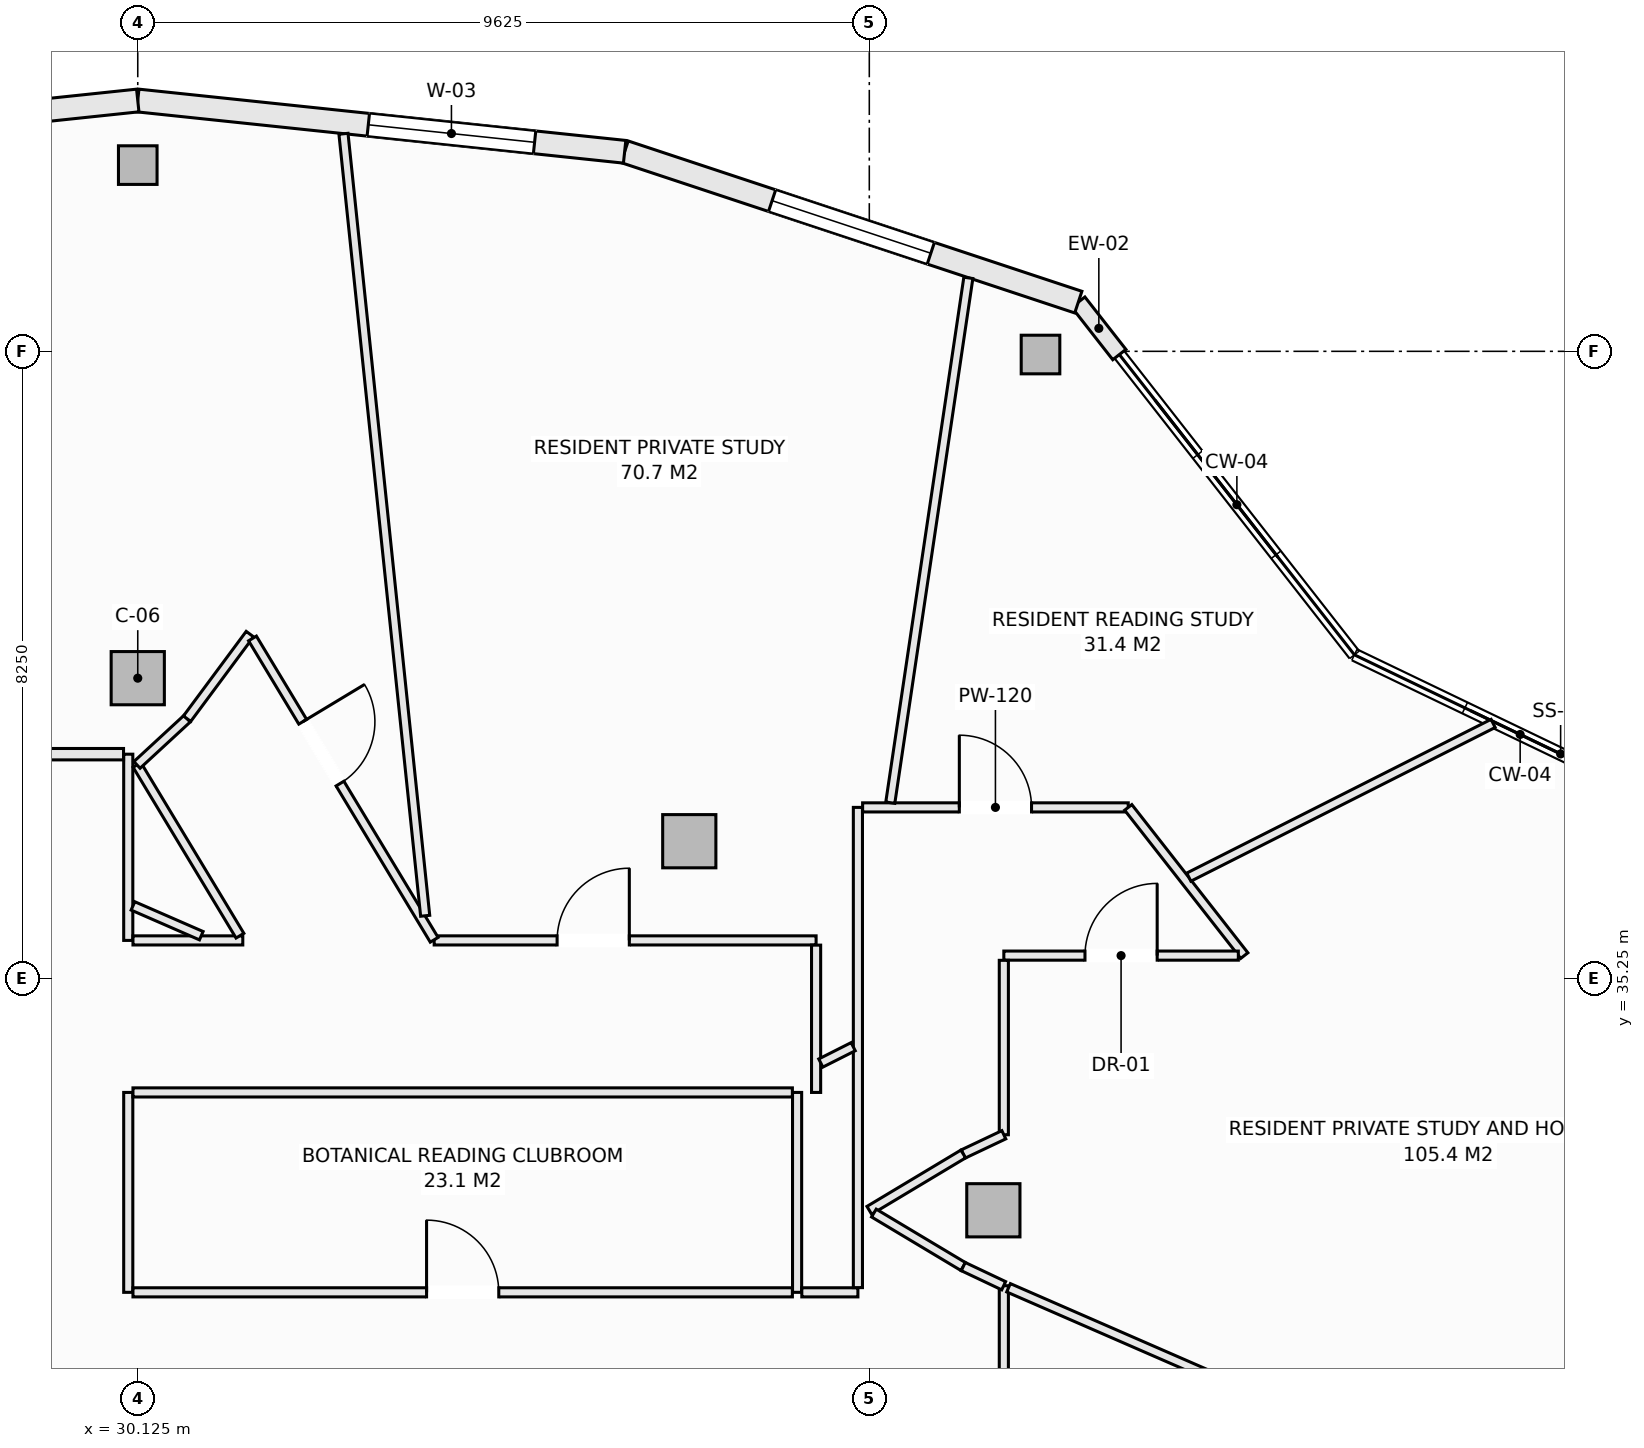
"""IFC4 building model, lengths in metres.
Left out: names, types, materials, properties, quantities, classifications, styles, units other than length and angle.
Written with IfcOpenShell. Run it as: python <this file> out.ifc"""

import sys

from ifc_helpers import new_model, si_unit, direction, frame, frame_2d, origin, origin_2d, place, context, subcontext, project, spatial, rectangle, hollow_rectangle, extrude, element, fill, save


model = new_model("IFC4")
c1 = context("Model", 3, precision=1e-05, world=origin(), true_north=direction((0.0, 1.0)))
c2 = subcontext(c1, "Body", "Model", "MODEL_VIEW")
j1 = project(units=[si_unit("LENGTHUNIT", "METRE"), si_unit("PLANEANGLEUNIT", "RADIAN")], contexts=[c1])
p1 = place(None, origin())
s1 = spatial("IfcSite", under=j1, at=p1, CompositionType="ELEMENT")
p2 = place(p1, origin())
s2 = spatial("IfcBuilding", under=s1, at=p2, CompositionType="ELEMENT")
p3 = place(p2, frame((0.0, 0.0, 226.1)))
s3 = spatial("IfcBuildingStorey", under=s2, at=p3, CompositionType="ELEMENT", Elevation=226.1)
for number, where, z_axis, x_axis in (
    (1, (42.003, 43.458, -0.27), (0.0, 0.0, 1.0), (1.0, 0.0, 0.0)),
    (2, (30.125, 45.95, -0.27), (0.0, 0.0, 1.0), (1.0, 0.0, 0.0)),
):
    element("IfcColumn", number, at=place(p3, frame(where, z_axis=z_axis, x_axis=x_axis)), inside=s3, PredefinedType="COLUMN", context=c2, shape_type="SweptSolid", body=[
        extrude(hollow_rectangle(XDim=0.508, YDim=0.508, WallThickness=0.019, at=origin_2d()), origin(), (0.0, 0.0, 1.0), 3.3),
    ])
for number, where, z_axis, x_axis in (
    (3, (41.382, 32.199, -0.27), (0.0, 0.0, 1.0), (1.0, 0.0, 0.0)),
    (4, (37.382, 37.055, -0.27), (0.0, 0.0, 1.0), (1.0, 0.0, 0.0)),
    (5, (30.125, 39.2, -0.27), (0.0, 0.0, 1.0), (1.0, 0.0, 0.0)),
):
    element("IfcColumn", number, at=place(p3, frame(where, z_axis=z_axis, x_axis=x_axis)), inside=s3, PredefinedType="COLUMN", context=c2, shape_type="SweptSolid", body=[
        extrude(rectangle(XDim=0.7, YDim=0.7, at=origin_2d()), origin(), (0.0, 0.0, 1.0), 3.3),
    ])
p4 = place(p3, frame((42.5, 44.147, 0.0), z_axis=(0.0, 0.0, 1.0), x_axis=(0.61650363284, -0.787352062736, 0.0)))
e6 = element("IfcWall", 6, at=p4, inside=s3, PredefinedType="SOLIDWALL", context=c2, shape_type="SweptSolid", body=[
    extrude(rectangle(XDim=0.876, YDim=0.22, at=frame_2d((0.438, 0.0))), origin(), (0.0, 0.0, 1.0), 2.605),
])
p5 = place(p3, frame((36.531, 46.125, 0.0), z_axis=(0.0, 0.0, 1.0), x_axis=(0.949240877604, -0.314550085495, 0.0)))
e7 = element("IfcWall", 7, at=p5, inside=s3, PredefinedType="SOLIDWALL", context=c2, shape_type="SweptSolid", body=[
    extrude(rectangle(XDim=6.288, YDim=0.3, at=frame_2d((3.144, 0.0))), origin(), (0.0, 0.0, 1.0), 2.605),
])
p6 = place(p5, frame((2.044, 0.0, 0.72)))
e8 = element("IfcOpeningElement", 8, at=p6, cuts=e7, PredefinedType="OPENING", context=c2, shape_type="SweptSolid", body=[
    extrude(rectangle(XDim=2.2, YDim=1.65, at=frame_2d((1.1, 0.825))), frame((0.0, 0.16, 0.0), z_axis=(0.0, -1.0, 0.0), x_axis=(1.0, 0.0, 0.0)), (0.0, 0.0, 1.0), 0.32),
])
p7 = place(p3, frame((30.125, 46.8, 0.0), z_axis=(0.0, 0.0, 1.0), x_axis=(0.994497142298, -0.104763705363, 0.0)))
e9 = element("IfcWall", 9, at=p7, inside=s3, PredefinedType="SOLIDWALL", context=c2, shape_type="SweptSolid", body=[
    extrude(rectangle(XDim=6.441, YDim=0.3, at=frame_2d((3.221, 0.0))), origin(), (0.0, 0.0, 1.0), 2.605),
])
p8 = place(p7, frame((3.05, 0.0, 0.72)))
e10 = element("IfcOpeningElement", 10, at=p8, cuts=e9, PredefinedType="OPENING", context=c2, shape_type="SweptSolid", body=[
    extrude(rectangle(XDim=2.2, YDim=1.65, at=frame_2d((1.1, 0.825))), frame((0.0, 0.16, 0.0), z_axis=(0.0, -1.0, 0.0), x_axis=(1.0, 0.0, 0.0)), (0.0, 0.0, 1.0), 0.32),
])
p9 = place(p3, frame((23.719, 46.125, 0.0), z_axis=(0.0, 0.0, 1.0), x_axis=(0.994497142298, 0.104763705363, 0.0)))
e11 = element("IfcWall", 11, at=p9, inside=s3, PredefinedType="SOLIDWALL", context=c2, shape_type="SweptSolid", body=[
    extrude(rectangle(XDim=6.441, YDim=0.3, at=frame_2d((3.221, 0.0))), origin(), (0.0, 0.0, 1.0), 2.605),
])
p10 = place(p9, frame((2.121, 0.0, 0.72)))
e12 = element("IfcOpeningElement", 12, at=p10, cuts=e11, PredefinedType="OPENING", context=c2, shape_type="SweptSolid", body=[
    extrude(rectangle(XDim=2.2, YDim=1.65, at=frame_2d((1.1, 0.825))), frame((0.0, 0.16, 0.0), z_axis=(0.0, -1.0, 0.0), x_axis=(1.0, 0.0, 0.0)), (0.0, 0.0, 1.0), 0.32),
])
p11 = place(p3, frame((30.0, 31.12, 0.0), z_axis=(0.0, 0.0, 1.0), x_axis=(0.0, 1.0, 0.0)))
e13 = element("IfcWall", 13, at=p11, inside=s3, PredefinedType="PARTITIONING", context=c2, shape_type="SweptSolid", body=[
    extrude(rectangle(XDim=2.63, YDim=0.12, at=frame_2d((1.315, 0.0))), origin(), (0.0, 0.0, 1.0), 3.03),
])
p12 = place(p3, frame((30.0, 35.75, 0.0), z_axis=(0.0, 0.0, 1.0), x_axis=(0.0, 1.0, 0.0)))
e14 = element("IfcWall", 14, at=p12, inside=s3, PredefinedType="PARTITIONING", context=c2, shape_type="SweptSolid", body=[
    extrude(rectangle(XDim=2.45, YDim=0.12, at=frame_2d((1.225, 0.0))), origin(), (0.0, 0.0, 1.0), 3.03),
])
p13 = place(p3, frame((38.8, 31.12, 0.0), z_axis=(0.0, 0.0, 1.0), x_axis=(0.0, 1.0, 0.0)))
e15 = element("IfcWall", 15, at=p13, inside=s3, PredefinedType="PARTITIONING", context=c2, shape_type="SweptSolid", body=[
    extrude(rectangle(XDim=2.63, YDim=0.12, at=frame_2d((1.315, 0.0))), origin(), (0.0, 0.0, 1.0), 3.03),
])
p14 = place(p3, frame((30.062, 31.12, 0.0), z_axis=(0.0, 0.0, 1.0), x_axis=(1.0, 0.0, 0.0)))
e16 = element("IfcWall", 16, at=p14, inside=s3, PredefinedType="PARTITIONING", context=c2, shape_type="SweptSolid", body=[
    extrude(rectangle(XDim=8.676, YDim=0.12, at=frame_2d((4.338, 0.0))), origin(), (0.0, 0.0, 1.0), 3.03),
])
p15 = place(p14, frame((3.863, 0.0, 0.0)))
e17 = element("IfcOpeningElement", 17, at=p15, cuts=e16, PredefinedType="OPENING", context=c2, shape_type="SweptSolid", body=[
    extrude(rectangle(XDim=0.95, YDim=2.1, at=frame_2d((0.475, 1.05))), frame((0.0, 0.07, 0.0), z_axis=(0.0, -1.0, 0.0), x_axis=(1.0, 0.0, 0.0)), (0.0, 0.0, 1.0), 0.14),
])
p16 = place(p3, frame((38.862, 31.12, 0.0), z_axis=(0.0, 0.0, 1.0), x_axis=(1.0, 0.0, 0.0)))
e18 = element("IfcWall", 18, at=p16, inside=s3, PredefinedType="PARTITIONING", context=c2, shape_type="SweptSolid", body=[
    extrude(rectangle(XDim=0.738, YDim=0.12, at=frame_2d((0.369, 0.0))), origin(), (0.0, 0.0, 1.0), 3.03),
])
p17 = place(p3, frame((30.062, 33.75, 0.0), z_axis=(0.0, 0.0, 1.0), x_axis=(1.0, 0.0, 0.0)))
e19 = element("IfcWall", 19, at=p17, inside=s3, PredefinedType="PARTITIONING", context=c2, shape_type="SweptSolid", body=[
    extrude(rectangle(XDim=8.676, YDim=0.12, at=frame_2d((4.338, 0.0))), origin(), (0.0, 0.0, 1.0), 3.03),
])
p18 = place(p3, frame((27.227, 38.2, 0.0), z_axis=(0.0, 0.0, 1.0), x_axis=(1.0, 0.0, 0.0)))
e20 = element("IfcWall", 20, at=p18, inside=s3, PredefinedType="PARTITIONING", context=c2, shape_type="SweptSolid", body=[
    extrude(rectangle(XDim=2.711, YDim=0.15, at=frame_2d((1.355, 0.0))), origin(), (0.0, 0.0, 1.0), 3.03),
])
p19 = place(p3, frame((30.062, 35.75, 0.0), z_axis=(0.0, 0.0, 1.0), x_axis=(1.0, 0.0, 0.0)))
e21 = element("IfcWall", 21, at=p19, inside=s3, PredefinedType="PARTITIONING", context=c2, shape_type="SweptSolid", body=[
    extrude(rectangle(XDim=1.445, YDim=0.12, at=frame_2d((0.723, 0.0))), origin(), (0.0, 0.0, 1.0), 3.03),
])
p20 = place(p3, frame((34.025, 35.75, 0.0), z_axis=(0.0, 0.0, 1.0), x_axis=(1.0, 0.0, 0.0)))
e22 = element("IfcWall", 22, at=p20, inside=s3, PredefinedType="PARTITIONING", context=c2, shape_type="SweptSolid", body=[
    extrude(rectangle(XDim=5.025, YDim=0.12, at=frame_2d((2.513, 0.0))), origin(), (0.0, 0.0, 1.0), 2.478),
])
p21 = place(p20, frame((1.617, 0.0, 0.0)))
e23 = element("IfcOpeningElement", 23, at=p21, cuts=e22, PredefinedType="OPENING", context=c2, shape_type="SweptSolid", body=[
    extrude(rectangle(XDim=0.95, YDim=2.1, at=frame_2d((0.475, 1.05))), frame((0.0, 0.07, 0.0), z_axis=(0.0, -1.0, 0.0), x_axis=(1.0, 0.0, 0.0)), (0.0, 0.0, 1.0), 0.14),
])
p22 = place(p3, frame((30.115, 38.059, 0.0), z_axis=(0.0, 0.0, 1.0), x_axis=(0.516246227887, -0.85644020935, 0.0)))
e24 = element("IfcWall", 24, at=p22, inside=s3, PredefinedType="PARTITIONING", context=c2, shape_type="SweptSolid", body=[
    extrude(rectangle(XDim=2.624, YDim=0.12, at=frame_2d((1.312, 0.0))), origin(), (0.0, 0.0, 1.0), 3.03),
])
p23 = place(p3, frame((30.115, 38.059, 0.0), z_axis=(0.0, 0.0, 1.0), x_axis=(0.734991343239, 0.678076489316, 0.0)))
e25 = element("IfcWall", 25, at=p23, inside=s3, PredefinedType="PARTITIONING", context=c2, shape_type="SweptSolid", body=[
    extrude(rectangle(XDim=0.896, YDim=0.12, at=frame_2d((0.448, 0.0))), origin(), (0.0, 0.0, 1.0), 3.03),
])
p24 = place(p3, frame((30.774, 38.667, 0.0), z_axis=(0.0, 0.0, 1.0), x_axis=(0.596019138224, 0.802970227885, 0.0)))
e26 = element("IfcWall", 26, at=p24, inside=s3, PredefinedType="PARTITIONING", context=c2, shape_type="SweptSolid", body=[
    extrude(rectangle(XDim=1.386, YDim=0.12, at=frame_2d((0.693, 0.0))), origin(), (0.0, 0.0, 1.0), 3.03),
])
p25 = place(p3, frame((31.635, 39.723, 0.0), z_axis=(0.0, 0.0, 1.0), x_axis=(0.516340331217, -0.856383478565, 0.0)))
e27 = element("IfcWall", 27, at=p25, inside=s3, PredefinedType="PARTITIONING", context=c2, shape_type="SweptSolid", body=[
    extrude(rectangle(XDim=4.629, YDim=0.12, at=frame_2d((2.315, 0.0))), origin(), (0.0, 0.0, 1.0), 3.03),
])
p26 = place(p25, frame((1.28, 0.0, 0.0)))
e28 = element("IfcOpeningElement", 28, at=p26, cuts=e27, PredefinedType="OPENING", context=c2, shape_type="SweptSolid", body=[
    extrude(rectangle(XDim=0.95, YDim=2.1, at=frame_2d((0.475, 1.05))), frame((0.0, 0.07, 0.0), z_axis=(0.0, -1.0, 0.0), x_axis=(1.0, 0.0, 0.0)), (0.0, 0.0, 1.0), 0.14),
])
p27 = place(p3, frame((39.05, 33.75, 0.0), z_axis=(0.0, 0.0, 1.0), x_axis=(0.0, 1.0, 0.0)))
e29 = element("IfcWall", 29, at=p27, inside=s3, PredefinedType="PARTITIONING", context=c2, shape_type="SweptSolid", body=[
    extrude(rectangle(XDim=1.938, YDim=0.12, at=frame_2d((0.969, 0.0))), origin(), (0.0, 0.0, 1.0), 3.03),
])
p28 = place(p3, frame((39.6, 31.182, 0.0), z_axis=(0.0, 0.0, 1.0), x_axis=(0.0, 1.0, 0.0)))
e30 = element("IfcWall", 30, at=p28, inside=s3, PredefinedType="PARTITIONING", context=c2, shape_type="SweptSolid", body=[
    extrude(rectangle(XDim=6.318, YDim=0.12, at=frame_2d((3.159, 0.0))), origin(), (0.0, 0.0, 1.0), 3.03),
])
p29 = place(p3, frame((39.662, 37.5, 0.0), z_axis=(0.0, 0.0, 1.0), x_axis=(1.0, 0.0, 0.0)))
e31 = element("IfcWall", 31, at=p29, inside=s3, PredefinedType="PARTITIONING", context=c2, shape_type="SweptSolid", body=[
    extrude(rectangle(XDim=3.495, YDim=0.12, at=frame_2d((1.748, 0.0))), origin(), (0.0, 0.0, 1.0), 2.77),
])
p30 = place(p29, frame((1.272, 0.0, 0.0)))
e32 = element("IfcOpeningElement", 32, at=p30, cuts=e31, PredefinedType="OPENING", context=c2, shape_type="SweptSolid", body=[
    extrude(rectangle(XDim=0.95, YDim=2.1, at=frame_2d((0.475, 1.05))), frame((0.0, 0.07, 0.0), z_axis=(0.0, -1.0, 0.0), x_axis=(1.0, 0.0, 0.0)), (0.0, 0.0, 1.0), 0.14),
])
p31 = place(p3, frame((43.157, 37.5, 0.0), z_axis=(0.0, 0.0, 1.0), x_axis=(0.616571357052, -0.78729902938, 0.0)))
e33 = element("IfcWall", 33, at=p31, inside=s3, PredefinedType="PARTITIONING", context=c2, shape_type="SweptSolid", body=[
    extrude(rectangle(XDim=2.477, YDim=0.12, at=frame_2d((1.238, 0.0))), origin(), (0.0, 0.0, 1.0), 3.03),
])
p32 = place(p3, frame((41.52, 35.55, 0.0), z_axis=(0.0, 0.0, 1.0), x_axis=(1.0, 0.0, 0.0)))
e34 = element("IfcWall", 34, at=p32, inside=s3, PredefinedType="PARTITIONING", context=c2, shape_type="SweptSolid", body=[
    extrude(rectangle(XDim=3.085, YDim=0.12, at=frame_2d((1.542, 0.0))), origin(), (0.0, 0.0, 1.0), 3.03),
])
p33 = place(p32, frame((1.068, 0.0, 0.0)))
e35 = element("IfcOpeningElement", 35, at=p33, cuts=e34, PredefinedType="OPENING", context=c2, shape_type="SweptSolid", body=[
    extrude(rectangle(XDim=0.95, YDim=2.1, at=frame_2d((0.475, 1.05))), frame((0.0, 0.07, 0.0), z_axis=(0.0, -1.0, 0.0), x_axis=(1.0, 0.0, 0.0)), (0.0, 0.0, 1.0), 0.14),
])
p34 = place(p3, frame((41.52, 22.794, 0.0), z_axis=(0.0, 0.0, 1.0), x_axis=(0.0, 1.0, 0.0)))
e36 = element("IfcWall", 36, at=p34, inside=s3, PredefinedType="PARTITIONING", context=c2, shape_type="SweptSolid", body=[
    extrude(rectangle(XDim=8.413, YDim=0.12, at=frame_2d((4.207, 0.0))), origin(), (0.0, 0.0, 1.0), 2.478),
])
p35 = place(p34, frame((2.471, 0.0, 0.0)))
e37 = element("IfcOpeningElement", 37, at=p35, cuts=e36, PredefinedType="OPENING", context=c2, shape_type="SweptSolid", body=[
    extrude(rectangle(XDim=0.95, YDim=2.1, at=frame_2d((0.475, 1.05))), frame((0.0, 0.07, 0.0), z_axis=(0.0, -1.0, 0.0), x_axis=(1.0, 0.0, 0.0)), (0.0, 0.0, 1.0), 0.14),
])
p36 = place(p3, frame((41.52, 33.193, 0.0), z_axis=(0.0, 0.0, 1.0), x_axis=(0.0, 1.0, 0.0)))
e38 = element("IfcWall", 38, at=p36, inside=s3, PredefinedType="PARTITIONING", context=c2, shape_type="SweptSolid", body=[
    extrude(rectangle(XDim=2.295, YDim=0.12, at=frame_2d((1.147, 0.0))), origin(), (0.0, 0.0, 1.0), 3.03),
])
p37 = place(p3, frame((40.986, 32.94, 0.0), z_axis=(0.0, 0.0, 1.0), x_axis=(0.90356951601, 0.428441512621, 0.0)))
e39 = element("IfcWall", 39, at=p37, inside=s3, PredefinedType="PARTITIONING", context=c2, shape_type="SweptSolid", body=[
    extrude(rectangle(XDim=0.591, YDim=0.12, at=frame_2d((0.295, 0.0))), origin(), (0.0, 0.0, 1.0), 3.03),
])
p38 = place(p3, frame((39.75, 32.199, 0.0), z_axis=(0.0, 0.0, 1.0), x_axis=(0.857702120906, 0.514146935996, 0.0)))
e40 = element("IfcWall", 40, at=p38, inside=s3, PredefinedType="PARTITIONING", context=c2, shape_type="SweptSolid", body=[
    extrude(rectangle(XDim=1.441, YDim=0.12, at=frame_2d((0.721, 0.0))), origin(), (0.0, 0.0, 1.0), 3.03),
])
p39 = place(p3, frame((39.81, 32.163, 0.0), z_axis=(0.0, 0.0, 1.0), x_axis=(0.858011245414, -0.513630901273, 0.0)))
e41 = element("IfcWall", 41, at=p39, inside=s3, PredefinedType="PARTITIONING", context=c2, shape_type="SweptSolid", body=[
    extrude(rectangle(XDim=1.37, YDim=0.12, at=frame_2d((0.685, 0.0))), origin(), (0.0, 0.0, 1.0), 3.03),
])
p40 = place(p3, frame((40.986, 31.459, 0.0), z_axis=(0.0, 0.0, 1.0), x_axis=(0.903687141457, -0.428193356283, 0.0)))
e42 = element("IfcWall", 42, at=p40, inside=s3, PredefinedType="PARTITIONING", context=c2, shape_type="SweptSolid", body=[
    extrude(rectangle(XDim=0.588, YDim=0.12, at=frame_2d((0.294, 0.0))), origin(), (0.0, 0.0, 1.0), 3.03),
])
p41 = place(p3, frame((30.062, 36.204, 0.0), z_axis=(0.0, 0.0, 1.0), x_axis=(0.916602414635, -0.39979996684, 0.0)))
e43 = element("IfcWall", 43, at=p41, inside=s3, PredefinedType="PARTITIONING", context=c2, shape_type="SweptSolid", body=[
    extrude(rectangle(XDim=0.981, YDim=0.12, at=frame_2d((0.49, 0.0))), origin(), (0.0, 0.0, 1.0), 3.03),
])
p42 = place(p3, frame((41.582, 31.18, 0.0), z_axis=(0.0, 0.0, 1.0), x_axis=(0.916624100851, -0.399750244202, 0.0)))
e44 = element("IfcWall", 44, at=p42, inside=s3, PredefinedType="PARTITIONING", context=c2, shape_type="SweptSolid", body=[
    extrude(rectangle(XDim=14.074, YDim=0.12, at=frame_2d((7.037, 0.0))), origin(), (0.0, 0.0, 1.0), 2.478),
])
p43 = place(p3, frame((39.112, 34.137, 0.0), z_axis=(0.0, 0.0, 1.0), x_axis=(0.892681104984, 0.450688855869, 0.0)))
e45 = element("IfcWall", 45, at=p43, inside=s3, PredefinedType="PARTITIONING", context=c2, shape_type="SweptSolid", body=[
    extrude(rectangle(XDim=0.477, YDim=0.12, at=frame_2d((0.239, 0.0))), origin(), (0.0, 0.0, 1.0), 3.03),
])
p44 = place(p3, frame((43.954, 36.583, 0.0), z_axis=(0.0, 0.0, 1.0), x_axis=(0.892601830049, 0.450845841716, 0.0)))
e46 = element("IfcWall", 46, at=p44, inside=s3, PredefinedType="PARTITIONING", context=c2, shape_type="SweptSolid", body=[
    extrude(rectangle(XDim=4.485, YDim=0.12, at=frame_2d((2.243, 0.0))), origin(), (0.0, 0.0, 1.0), 3.03),
])
p45 = place(p3, frame((40.026, 37.562, 0.0), z_axis=(0.0, 0.0, 1.0), x_axis=(0.147138038827, 0.989115967685, 0.0)))
e47 = element("IfcWall", 47, at=p45, inside=s3, PredefinedType="PARTITIONING", context=c2, shape_type="SweptSolid", body=[
    extrude(rectangle(XDim=6.98, YDim=0.12, at=frame_2d((3.49, 0.0))), origin(), (0.0, 0.0, 1.0), 2.478),
])
p46 = place(p3, frame((32.832, 46.362, 0.0), z_axis=(0.0, 0.0, 1.0), x_axis=(0.103942686354, -0.994583288595, 0.0)))
e48 = element("IfcWall", 48, at=p46, inside=s3, PredefinedType="PARTITIONING", context=c2, shape_type="SweptSolid", body=[
    extrude(rectangle(XDim=10.344, YDim=0.12, at=frame_2d((5.172, 0.0))), origin(), (0.0, 0.0, 1.0), 2.77),
])
p47 = place(p6, origin())
e49 = element("IfcWindow", 49, at=p47, inside=s3, PartitioningType="SINGLE_PANEL", PredefinedType="WINDOW", context=c2, shape_type="SweptSolid", body=[
    extrude(rectangle(XDim=2.2, YDim=1.65, at=frame_2d((1.1, 0.825))), frame((0.0, 0.03, 0.0), z_axis=(0.0, -1.0, 0.0), x_axis=(1.0, 0.0, 0.0)), (0.0, 0.0, 1.0), 0.06),
])
fill(e8, e49)
p48 = place(p8, origin())
e50 = element("IfcWindow", 50, at=p48, inside=s3, PartitioningType="SINGLE_PANEL", PredefinedType="WINDOW", context=c2, shape_type="SweptSolid", body=[
    extrude(rectangle(XDim=2.2, YDim=1.65, at=frame_2d((1.1, 0.825))), frame((0.0, 0.03, 0.0), z_axis=(0.0, -1.0, 0.0), x_axis=(1.0, 0.0, 0.0)), (0.0, 0.0, 1.0), 0.06),
])
fill(e10, e50)
p49 = place(p15, origin())
e51 = element("IfcDoor", 51, at=p49, inside=s3, OperationType="SINGLE_SWING_LEFT", PredefinedType="DOOR", context=c2, shape_type="SweptSolid", body=[
    extrude(rectangle(XDim=0.95, YDim=2.1, at=frame_2d((0.475, 1.05))), frame((0.0, 0.025, 0.0), z_axis=(0.0, -1.0, 0.0), x_axis=(1.0, 0.0, 0.0)), (0.0, 0.0, 1.0), 0.05),
])
fill(e17, e51)
p50 = place(p33, origin())
e52 = element("IfcDoor", 52, at=p50, inside=s3, OperationType="SINGLE_SWING_RIGHT", PredefinedType="DOOR", context=c2, shape_type="SweptSolid", body=[
    extrude(rectangle(XDim=0.95, YDim=2.1, at=frame_2d((0.475, 1.05))), frame((0.0, 0.025, 0.0), z_axis=(0.0, -1.0, 0.0), x_axis=(1.0, 0.0, 0.0)), (0.0, 0.0, 1.0), 0.05),
])
fill(e35, e52)
p51 = place(p30, origin())
e53 = element("IfcDoor", 53, at=p51, inside=s3, OperationType="SINGLE_SWING_LEFT", PredefinedType="DOOR", context=c2, shape_type="SweptSolid", body=[
    extrude(rectangle(XDim=0.95, YDim=2.1, at=frame_2d((0.475, 1.05))), frame((0.0, 0.025, 0.0), z_axis=(0.0, -1.0, 0.0), x_axis=(1.0, 0.0, 0.0)), (0.0, 0.0, 1.0), 0.05),
])
fill(e32, e53)
p52 = place(p21, origin())
e54 = element("IfcDoor", 54, at=p52, inside=s3, OperationType="SINGLE_SWING_RIGHT", PredefinedType="DOOR", context=c2, shape_type="SweptSolid", body=[
    extrude(rectangle(XDim=0.95, YDim=2.1, at=frame_2d((0.475, 1.05))), frame((0.0, 0.025, 0.0), z_axis=(0.0, -1.0, 0.0), x_axis=(1.0, 0.0, 0.0)), (0.0, 0.0, 1.0), 0.05),
])
fill(e23, e54)
p53 = place(p26, origin())
e55 = element("IfcDoor", 55, at=p53, inside=s3, OperationType="SINGLE_SWING_LEFT", PredefinedType="DOOR", context=c2, shape_type="SweptSolid", body=[
    extrude(rectangle(XDim=0.95, YDim=2.1, at=frame_2d((0.475, 1.05))), frame((0.0, 0.025, 0.0), z_axis=(0.0, -1.0, 0.0), x_axis=(1.0, 0.0, 0.0)), (0.0, 0.0, 1.0), 0.05),
])
fill(e28, e55)
save(model, sys.argv[1])
